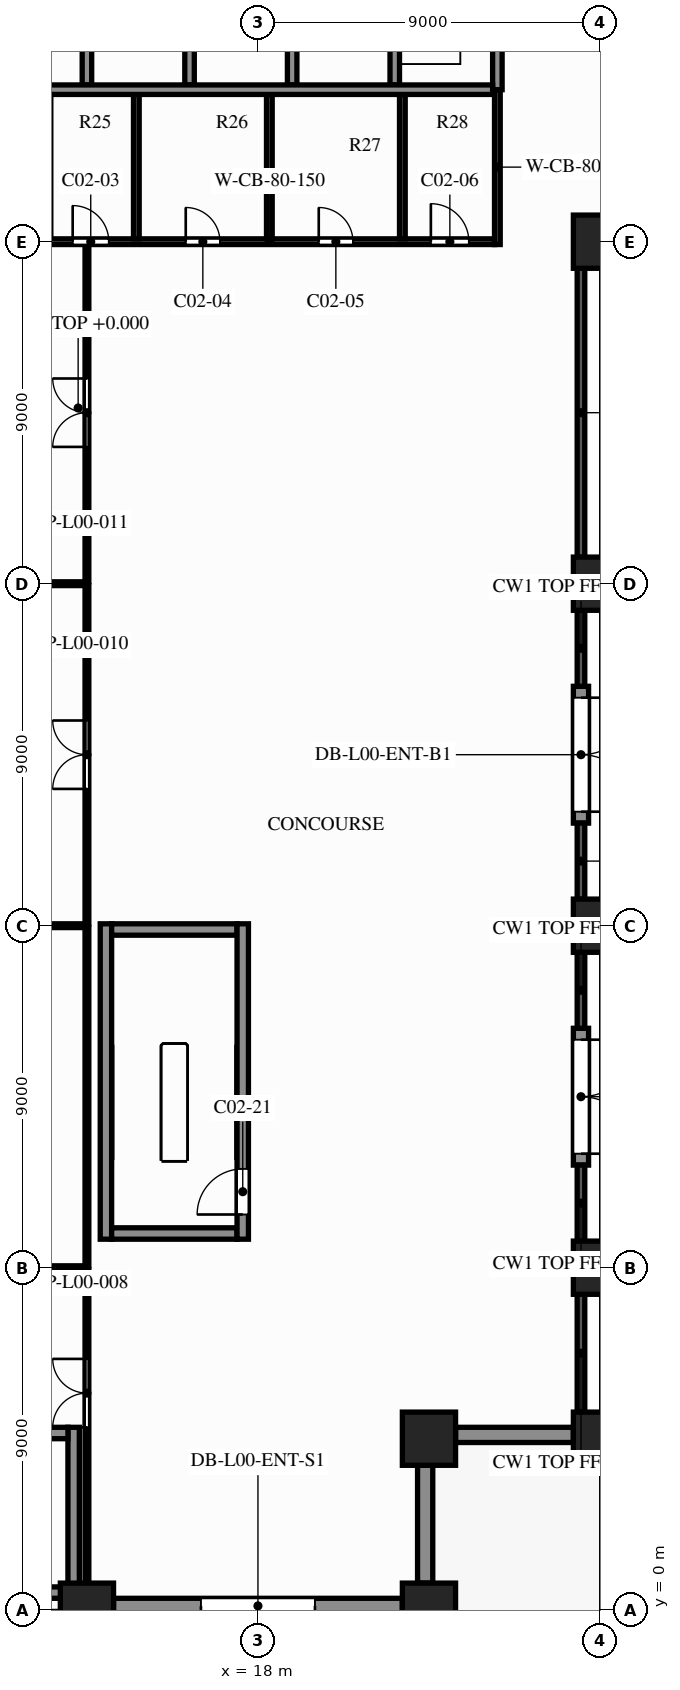
"""IFC4 building model, lengths in metres.
Left out: names, types, materials, properties, quantities, classifications, styles, units other than length and angle.
Written with IfcOpenShell. Run it as: python <this file> out.ifc"""

import sys

from ifc_helpers import new_model, si_unit, direction, frame, frame_2d, origin, origin_2d, place, context, subcontext, project, spatial, rectangle, extrude, element, fill, save


model = new_model("IFC4")
c1 = context("Model", 3, precision=1e-05, world=origin(), true_north=direction((0.0, 1.0)))
c2 = subcontext(c1, "Body", "Model", "MODEL_VIEW")
j1 = project(units=[si_unit("LENGTHUNIT", "METRE"), si_unit("PLANEANGLEUNIT", "RADIAN")], contexts=[c1])
p1 = place(None, origin())
s1 = spatial("IfcSite", under=j1, at=p1, CompositionType="ELEMENT")
p2 = place(p1, origin())
s2 = spatial("IfcBuilding", under=s1, at=p2, CompositionType="ELEMENT")
p3 = place(p2, origin())
s3 = spatial("IfcBuildingStorey", under=s2, at=p3, CompositionType="ELEMENT", Elevation=0.0)
for number, where, z_axis, x_axis in (
    (1, (13.5, 0.0, 0.0), (0.0, 0.0, 1.0), (1.0, 0.0, 0.0)),
    (2, (22.5, 0.0, 0.0), (0.0, 0.0, 1.0), (1.0, 0.0, 0.0)),
    (3, (27.0, 4.5, 0.0), (0.0, 0.0, 1.0), (1.0, 0.0, 0.0)),
    (4, (27.0, 9.0, 0.0), (0.0, 0.0, 1.0), (1.0, 0.0, 0.0)),
    (5, (27.0, 18.0, 0.0), (0.0, 0.0, 1.0), (1.0, 0.0, 0.0)),
    (6, (27.0, 27.0, 0.0), (0.0, 0.0, 1.0), (1.0, 0.0, 0.0)),
    (7, (27.0, 36.0, 0.0), (0.0, 0.0, 1.0), (1.0, 0.0, 0.0)),
    (8, (22.5, 4.5, 0.0), (0.0, 0.0, 1.0), (1.0, 0.0, 0.0)),
):
    element("IfcColumn", number, at=place(p3, frame(where, z_axis=z_axis, x_axis=x_axis)), inside=s3, PredefinedType="COLUMN", context=c2, shape_type="SweptSolid", body=[
        extrude(rectangle(XDim=1.4, YDim=1.4, at=origin_2d()), origin(), (0.0, 0.0, 1.0), 7.5),
    ])
p4 = place(p3, frame((21.8, 0.1, 0.0), z_axis=(0.0, 0.0, 1.0), x_axis=(-1.0, 0.0, 0.0)))
e9 = element("IfcWall", 9, at=p4, inside=s3, PredefinedType="SOLIDWALL", context=c2, shape_type="SweptSolid", body=[
    extrude(rectangle(XDim=7.6, YDim=0.4, at=frame_2d((3.8, 0.0))), origin(), (0.0, 0.0, 1.0), 6.6),
])
p5 = place(p4, frame((2.3, 0.0, 0.0)))
e10 = element("IfcOpeningElement", 10, at=p5, cuts=e9, PredefinedType="OPENING", context=c2, shape_type="SweptSolid", body=[
    extrude(rectangle(XDim=3.0, YDim=3.0, at=frame_2d((1.5, 1.5))), frame((0.0, 0.21, 0.0), z_axis=(0.0, -1.0, 0.0), x_axis=(1.0, 0.0, 0.0)), (0.0, 0.0, 1.0), 0.42),
])
for number, where, z_axis, x_axis in (
    (11, (22.4, 3.8, 0.0), (0.0, 0.0, 1.0), (0.0, -1.0, 0.0)),
    (12, (26.3, 4.6, 0.0), (0.0, 0.0, 1.0), (-1.0, 0.0, 0.0)),
):
    element("IfcWall", number, at=place(p3, frame(where, z_axis=z_axis, x_axis=x_axis)), inside=s3, PredefinedType="SOLIDWALL", context=c2, shape_type="SweptSolid", body=[
        extrude(rectangle(XDim=3.1, YDim=0.4, at=frame_2d((1.55, 0.0))), origin(), (0.0, 0.0, 1.0), 6.6),
    ])
p6 = place(p3, frame((26.5, 15.3, 0.0), z_axis=(0.0, 0.0, 1.0), x_axis=(0.0, -1.0, 0.0)))
e13 = element("IfcWall", 13, at=p6, inside=s3, PredefinedType="SOLIDWALL", context=c2, shape_type="SweptSolid", body=[
    extrude(rectangle(XDim=3.6, YDim=0.4, at=frame_2d((1.8, 0.0))), origin(), (0.0, 0.0, 1.0), 6.6),
])
p7 = place(p6, frame((0.3, 0.0, 0.0)))
e14 = element("IfcOpeningElement", 14, at=p7, cuts=e13, PredefinedType="OPENING", context=c2, shape_type="SweptSolid", body=[
    extrude(rectangle(XDim=3.0, YDim=3.0, at=frame_2d((1.5, 1.5))), frame((0.0, 0.21, 0.0), z_axis=(0.0, -1.0, 0.0), x_axis=(1.0, 0.0, 0.0)), (0.0, 0.0, 1.0), 0.42),
])
p8 = place(p3, frame((26.5, 24.3, 0.0), z_axis=(0.0, 0.0, 1.0), x_axis=(0.0, -1.0, 0.0)))
e15 = element("IfcWall", 15, at=p8, inside=s3, PredefinedType="SOLIDWALL", context=c2, shape_type="SweptSolid", body=[
    extrude(rectangle(XDim=3.6, YDim=0.4, at=frame_2d((1.8, 0.0))), origin(), (0.0, 0.0, 1.0), 6.6),
])
p9 = place(p8, frame((0.3, 0.0, 0.0)))
e16 = element("IfcOpeningElement", 16, at=p9, cuts=e15, PredefinedType="OPENING", context=c2, shape_type="SweptSolid", body=[
    extrude(rectangle(XDim=3.0, YDim=3.0, at=frame_2d((1.5, 1.5))), frame((0.0, 0.21, 0.0), z_axis=(0.0, -1.0, 0.0), x_axis=(1.0, 0.0, 0.0)), (0.0, 0.0, 1.0), 0.42),
])
p10 = place(p3, frame((5.0, 0.45, 0.0), z_axis=(0.0, 0.0, 1.0), x_axis=(1.0, 0.0, 0.0)))
e17 = element("IfcWall", 17, at=p10, inside=s3, PredefinedType="SHEAR", context=c2, shape_type="SweptSolid", body=[
    extrude(rectangle(XDim=8.0, YDim=0.3, at=frame_2d((4.0, 0.0))), origin(), (0.0, 0.0, 1.0), 7.2),
])
p11 = place(p10, frame((0.5, 0.0, 0.0)))
e18 = element("IfcOpeningElement", 18, at=p11, cuts=e17, PredefinedType="OPENING", context=c2, shape_type="SweptSolid", body=[
    extrude(rectangle(XDim=1.2, YDim=2.2, at=frame_2d((0.6, 1.1))), frame((0.0, 0.16, 0.0), z_axis=(0.0, -1.0, 0.0), x_axis=(1.0, 0.0, 0.0)), (0.0, 0.0, 1.0), 0.32),
])
p12 = place(p3, frame((5.0, 4.65, 0.0), z_axis=(0.0, 0.0, 1.0), x_axis=(1.0, 0.0, 0.0)))
e19 = element("IfcWall", 19, at=p12, inside=s3, PredefinedType="SHEAR", context=c2, shape_type="SweptSolid", body=[
    extrude(rectangle(XDim=8.0, YDim=0.3, at=frame_2d((4.0, 0.0))), origin(), (0.0, 0.0, 1.0), 7.2),
])
p13 = place(p12, frame((0.5, 0.0, 0.0)))
e20 = element("IfcOpeningElement", 20, at=p13, cuts=e19, PredefinedType="OPENING", context=c2, shape_type="SweptSolid", body=[
    extrude(rectangle(XDim=1.2, YDim=2.2, at=frame_2d((0.6, 1.1))), frame((0.0, 0.16, 0.0), z_axis=(0.0, -1.0, 0.0), x_axis=(1.0, 0.0, 0.0)), (0.0, 0.0, 1.0), 0.32),
])
for number, where, z_axis, x_axis in (
    (21, (14.15, 9.9, 0.0), (0.0, 0.0, 1.0), (1.0, 0.0, 0.0)),
    (22, (14.15, 17.9, 0.0), (0.0, 0.0, 1.0), (1.0, 0.0, 0.0)),
):
    element("IfcWall", number, at=place(p3, frame(where, z_axis=z_axis, x_axis=x_axis)), inside=s3, PredefinedType="SHEAR", context=c2, shape_type="SweptSolid", body=[
        extrude(rectangle(XDim=3.3, YDim=0.3, at=frame_2d((1.65, 0.0))), origin(), (0.0, 0.0, 1.0), 7.2),
    ])
p14 = place(p3, frame((12.4, 36.0, 0.0), z_axis=(0.0, 0.0, 1.0), x_axis=(1.0, 0.0, 0.0)))
e23 = element("IfcWall", 23, at=p14, inside=s3, PredefinedType="SHEAR", context=c2, shape_type="SweptSolid", body=[
    extrude(rectangle(XDim=11.825, YDim=0.15, at=frame_2d((5.913, 0.0))), origin(), (0.0, 0.0, 1.0), 7.2),
])
p15 = place(p14, frame((0.725, 0.0, 0.0)))
e24 = element("IfcOpeningElement", 24, at=p15, cuts=e23, PredefinedType="OPENING", context=c2, shape_type="SweptSolid", body=[
    extrude(rectangle(XDim=0.95, YDim=2.1, at=frame_2d((0.475, 1.05))), frame((0.0, 0.085, 0.0), z_axis=(0.0, -1.0, 0.0), x_axis=(1.0, 0.0, 0.0)), (0.0, 0.0, 1.0), 0.17),
])
p16 = place(p14, frame((3.7, 0.0, 0.0)))
e25 = element("IfcOpeningElement", 25, at=p16, cuts=e23, PredefinedType="OPENING", context=c2, shape_type="SweptSolid", body=[
    extrude(rectangle(XDim=0.9, YDim=2.1, at=frame_2d((0.45, 1.05))), frame((0.0, 0.085, 0.0), z_axis=(0.0, -1.0, 0.0), x_axis=(1.0, 0.0, 0.0)), (0.0, 0.0, 1.0), 0.17),
])
p17 = place(p14, frame((7.2, 0.0, 0.0)))
e26 = element("IfcOpeningElement", 26, at=p17, cuts=e23, PredefinedType="OPENING", context=c2, shape_type="SweptSolid", body=[
    extrude(rectangle(XDim=0.9, YDim=2.1, at=frame_2d((0.45, 1.05))), frame((0.0, 0.085, 0.0), z_axis=(0.0, -1.0, 0.0), x_axis=(1.0, 0.0, 0.0)), (0.0, 0.0, 1.0), 0.17),
])
p18 = place(p14, frame((10.15, 0.0, 0.0)))
e27 = element("IfcOpeningElement", 27, at=p18, cuts=e23, PredefinedType="OPENING", context=c2, shape_type="SweptSolid", body=[
    extrude(rectangle(XDim=1.0, YDim=2.1, at=frame_2d((0.5, 1.05))), frame((0.0, 0.085, 0.0), z_axis=(0.0, -1.0, 0.0), x_axis=(1.0, 0.0, 0.0)), (0.0, 0.0, 1.0), 0.17),
])
p19 = place(p3, frame((8.1, 40.0, 0.0), z_axis=(0.0, 0.0, 1.0), x_axis=(1.0, 0.0, 0.0)))
e28 = element("IfcWall", 28, at=p19, inside=s3, PredefinedType="SHEAR", context=c2, shape_type="SweptSolid", body=[
    extrude(rectangle(XDim=16.075, YDim=0.25, at=frame_2d((8.038, 0.0))), origin(), (0.0, 0.0, 1.0), 7.2),
])
p20 = place(p3, frame((13.15, 0.3, 0.0), z_axis=(0.0, 0.0, 1.0), x_axis=(0.0, 1.0, 0.0)))
e29 = element("IfcWall", 29, at=p20, inside=s3, PredefinedType="SHEAR", context=c2, shape_type="SweptSolid", body=[
    extrude(rectangle(XDim=4.5, YDim=0.3, at=frame_2d((2.25, 0.0))), origin(), (0.0, 0.0, 1.0), 7.2),
])
p21 = place(p3, frame((13.5, 40.125, 0.0), z_axis=(0.0, 0.0, 1.0), x_axis=(0.0, 1.0, 0.0)))
e30 = element("IfcWall", 30, at=p21, inside=s3, PredefinedType="SHEAR", context=c2, shape_type="SweptSolid", body=[
    extrude(rectangle(XDim=2.95, YDim=0.25, at=frame_2d((1.475, 0.0))), origin(), (0.0, 0.0, 1.0), 7.2),
])
p22 = place(p3, frame((14.0, 9.75, 0.0), z_axis=(0.0, 0.0, 1.0), x_axis=(0.0, 1.0, 0.0)))
e31 = element("IfcWall", 31, at=p22, inside=s3, PredefinedType="SHEAR", context=c2, shape_type="SweptSolid", body=[
    extrude(rectangle(XDim=8.3, YDim=0.3, at=frame_2d((4.15, 0.0))), origin(), (0.0, 0.0, 1.0), 7.2),
])
p23 = place(p3, frame((14.8, 36.075, 0.0), z_axis=(0.0, 0.0, 1.0), x_axis=(0.0, 1.0, 0.0)))
e32 = element("IfcWall", 32, at=p23, inside=s3, PredefinedType="PARTITIONING", context=c2, shape_type="SweptSolid", body=[
    extrude(rectangle(XDim=3.8, YDim=0.15, at=frame_2d((1.9, 0.0))), origin(), (0.0, 0.0, 1.0), 7.2),
])
p24 = place(p3, frame((16.2, 40.125, 0.0), z_axis=(0.0, 0.0, 1.0), x_axis=(0.0, 1.0, 0.0)))
e33 = element("IfcWall", 33, at=p24, inside=s3, PredefinedType="SHEAR", context=c2, shape_type="SweptSolid", body=[
    extrude(rectangle(XDim=2.95, YDim=0.25, at=frame_2d((1.475, 0.0))), origin(), (0.0, 0.0, 1.0), 7.2),
])
p25 = place(p3, frame((17.6, 9.75, 0.0), z_axis=(0.0, 0.0, 1.0), x_axis=(0.0, 1.0, 0.0)))
e34 = element("IfcWall", 34, at=p25, inside=s3, PredefinedType="SHEAR", context=c2, shape_type="SweptSolid", body=[
    extrude(rectangle(XDim=8.3, YDim=0.3, at=frame_2d((4.15, 0.0))), origin(), (0.0, 0.0, 1.0), 7.2),
])
p26 = place(p25, frame((0.65, 0.0, 0.0)))
e35 = element("IfcOpeningElement", 35, at=p26, cuts=e34, PredefinedType="OPENING", context=c2, shape_type="SweptSolid", body=[
    extrude(rectangle(XDim=1.2, YDim=2.2, at=frame_2d((0.6, 1.1))), frame((0.0, 0.16, 0.0), z_axis=(0.0, -1.0, 0.0), x_axis=(1.0, 0.0, 0.0)), (0.0, 0.0, 1.0), 0.32),
])
p27 = place(p3, frame((18.3, 36.075, 0.0), z_axis=(0.0, 0.0, 1.0), x_axis=(0.0, 1.0, 0.0)))
e36 = element("IfcWall", 36, at=p27, inside=s3, PredefinedType="PARTITIONING", context=c2, shape_type="SweptSolid", body=[
    extrude(rectangle(XDim=3.8, YDim=0.15, at=frame_2d((1.9, 0.0))), origin(), (0.0, 0.0, 1.0), 7.2),
])
for number, where, z_axis, x_axis in (
    (37, (18.9, 40.125, 0.0), (0.0, 0.0, 1.0), (0.0, 1.0, 0.0)),
    (38, (21.6, 40.125, 0.0), (0.0, 0.0, 1.0), (0.0, 1.0, 0.0)),
):
    element("IfcWall", number, at=place(p3, frame(where, z_axis=z_axis, x_axis=x_axis)), inside=s3, PredefinedType="SHEAR", context=c2, shape_type="SweptSolid", body=[
        extrude(rectangle(XDim=2.95, YDim=0.25, at=frame_2d((1.475, 0.0))), origin(), (0.0, 0.0, 1.0), 7.2),
    ])
p28 = place(p3, frame((21.8, 36.075, 0.0), z_axis=(0.0, 0.0, 1.0), x_axis=(0.0, 1.0, 0.0)))
e39 = element("IfcWall", 39, at=p28, inside=s3, PredefinedType="PARTITIONING", context=c2, shape_type="SweptSolid", body=[
    extrude(rectangle(XDim=3.8, YDim=0.15, at=frame_2d((1.9, 0.0))), origin(), (0.0, 0.0, 1.0), 7.2),
])
p29 = place(p3, frame((24.3, 35.925, 0.0), z_axis=(0.0, 0.0, 1.0), x_axis=(0.0, 1.0, 0.0)))
e40 = element("IfcWall", 40, at=p29, inside=s3, PredefinedType="SHEAR", context=c2, shape_type="SweptSolid", body=[
    extrude(rectangle(XDim=4.075, YDim=0.15, at=frame_2d((2.038, 0.0))), origin(), (0.0, 0.0, 1.0), 7.2),
])
p30 = place(p3, frame((24.3, 40.0, 0.0), z_axis=(0.0, 0.0, 1.0), x_axis=(0.0, 1.0, 0.0)))
e41 = element("IfcWall", 41, at=p30, inside=s3, PredefinedType="SHEAR", context=c2, shape_type="SweptSolid", body=[
    extrude(rectangle(XDim=3.325, YDim=0.25, at=frame_2d((1.663, 0.0))), origin(), (0.0, 0.0, 1.0), 7.2),
])
p31 = place(p3, frame((13.5, 0.72, 0.0), z_axis=(0.0, 0.0, 1.0), x_axis=(0.0, 1.0, 0.0)))
e42 = element("IfcWall", 42, at=p31, inside=s3, PredefinedType="PARTITIONING", context=c2, shape_type="SweptSolid", body=[
    extrude(rectangle(XDim=8.23, YDim=0.1, at=frame_2d((4.115, 0.0))), origin(), (0.0, 0.0, 1.0), 6.48),
])
p32 = place(p31, frame((4.08, 0.0, 0.0)))
e43 = element("IfcOpeningElement", 43, at=p32, cuts=e42, PredefinedType="OPENING", context=c2, shape_type="SweptSolid", body=[
    extrude(rectangle(XDim=1.8, YDim=2.1, at=frame_2d((0.9, 1.05))), frame((0.0, 0.06, 0.0), z_axis=(0.0, -1.0, 0.0), x_axis=(1.0, 0.0, 0.0)), (0.0, 0.0, 1.0), 0.12),
])
p33 = place(p3, frame((0.72, 9.0, 0.0), z_axis=(0.0, 0.0, 1.0), x_axis=(1.0, 0.0, 0.0)))
e44 = element("IfcWall", 44, at=p33, inside=s3, PredefinedType="PARTITIONING", context=c2, shape_type="SweptSolid", body=[
    extrude(rectangle(XDim=12.73, YDim=0.1, at=frame_2d((6.365, 0.0))), origin(), (0.0, 0.0, 1.0), 6.48),
])
p34 = place(p33, frame((5.58, 0.0, 0.0)))
e45 = element("IfcOpeningElement", 45, at=p34, cuts=e44, PredefinedType="OPENING", context=c2, shape_type="SweptSolid", body=[
    extrude(rectangle(XDim=0.9, YDim=2.1, at=frame_2d((0.45, 1.05))), frame((0.0, 0.06, 0.0), z_axis=(0.0, -1.0, 0.0), x_axis=(1.0, 0.0, 0.0)), (0.0, 0.0, 1.0), 0.12),
])
p35 = place(p3, frame((13.5, 9.05, 0.0), z_axis=(0.0, 0.0, 1.0), x_axis=(0.0, 1.0, 0.0)))
e46 = element("IfcWall", 46, at=p35, inside=s3, PredefinedType="PARTITIONING", context=c2, shape_type="SweptSolid", body=[
    extrude(rectangle(XDim=8.9, YDim=0.1, at=frame_2d((4.45, 0.0))), origin(), (0.0, 0.0, 1.0), 6.48),
])
p36 = place(p3, frame((-0.18, 18.0, 0.0), z_axis=(0.0, 0.0, 1.0), x_axis=(1.0, 0.0, 0.0)))
e47 = element("IfcWall", 47, at=p36, inside=s3, PredefinedType="PARTITIONING", context=c2, shape_type="SweptSolid", body=[
    extrude(rectangle(XDim=13.63, YDim=0.1, at=frame_2d((6.815, 0.0))), origin(), (0.0, 0.0, 1.0), 6.48),
])
p37 = place(p3, frame((13.5, 18.05, 0.0), z_axis=(0.0, 0.0, 1.0), x_axis=(0.0, 1.0, 0.0)))
e48 = element("IfcWall", 48, at=p37, inside=s3, PredefinedType="PARTITIONING", context=c2, shape_type="SweptSolid", body=[
    extrude(rectangle(XDim=8.9, YDim=0.1, at=frame_2d((4.45, 0.0))), origin(), (0.0, 0.0, 1.0), 6.48),
])
p38 = place(p37, frame((3.55, 0.0, 0.0)))
e49 = element("IfcOpeningElement", 49, at=p38, cuts=e48, PredefinedType="OPENING", context=c2, shape_type="SweptSolid", body=[
    extrude(rectangle(XDim=1.8, YDim=2.1, at=frame_2d((0.9, 1.05))), frame((0.0, 0.06, 0.0), z_axis=(0.0, -1.0, 0.0), x_axis=(1.0, 0.0, 0.0)), (0.0, 0.0, 1.0), 0.12),
])
p39 = place(p3, frame((10.9, 27.0, 0.0), z_axis=(0.0, 0.0, 1.0), x_axis=(1.0, 0.0, 0.0)))
e50 = element("IfcWall", 50, at=p39, inside=s3, PredefinedType="PARTITIONING", context=c2, shape_type="SweptSolid", body=[
    extrude(rectangle(XDim=2.55, YDim=0.1, at=frame_2d((1.275, 0.0))), origin(), (0.0, 0.0, 1.0), 6.48),
])
p40 = place(p3, frame((13.5, 27.05, 0.0), z_axis=(0.0, 0.0, 1.0), x_axis=(0.0, 1.0, 0.0)))
e51 = element("IfcWall", 51, at=p40, inside=s3, PredefinedType="PARTITIONING", context=c2, shape_type="SweptSolid", body=[
    extrude(rectangle(XDim=8.8, YDim=0.1, at=frame_2d((4.4, 0.0))), origin(), (0.0, 0.0, 1.0), 6.48),
])
p41 = place(p40, frame((3.55, 0.0, 0.0)))
e52 = element("IfcOpeningElement", 52, at=p41, cuts=e51, PredefinedType="OPENING", context=c2, shape_type="SweptSolid", body=[
    extrude(rectangle(XDim=1.8, YDim=2.1, at=frame_2d((0.9, 1.05))), frame((0.0, 0.06, 0.0), z_axis=(0.0, -1.0, 0.0), x_axis=(1.0, 0.0, 0.0)), (0.0, 0.0, 1.0), 0.12),
])
p42 = place(p5, origin())
e53 = element("IfcDoor", 53, at=p42, inside=s3, OperationType="DOUBLE_DOOR_SINGLE_SWING", PredefinedType="DOOR", context=c2, shape_type="SweptSolid", body=[
    extrude(rectangle(XDim=3.0, YDim=3.0, at=frame_2d((1.5, 1.5))), frame((0.0, 0.025, 0.0), z_axis=(0.0, -1.0, 0.0), x_axis=(1.0, 0.0, 0.0)), (0.0, 0.0, 1.0), 0.05),
])
fill(e10, e53)
p43 = place(p7, origin())
e54 = element("IfcDoor", 54, at=p43, inside=s3, OperationType="DOUBLE_DOOR_SINGLE_SWING", PredefinedType="DOOR", context=c2, shape_type="SweptSolid", body=[
    extrude(rectangle(XDim=3.0, YDim=3.0, at=frame_2d((1.5, 1.5))), frame((0.0, 0.025, 0.0), z_axis=(0.0, -1.0, 0.0), x_axis=(1.0, 0.0, 0.0)), (0.0, 0.0, 1.0), 0.05),
])
fill(e14, e54)
p44 = place(p9, origin())
e55 = element("IfcDoor", 55, at=p44, inside=s3, OperationType="DOUBLE_DOOR_SINGLE_SWING", PredefinedType="DOOR", context=c2, shape_type="SweptSolid", body=[
    extrude(rectangle(XDim=3.0, YDim=3.0, at=frame_2d((1.5, 1.5))), frame((0.0, 0.025, 0.0), z_axis=(0.0, -1.0, 0.0), x_axis=(1.0, 0.0, 0.0)), (0.0, 0.0, 1.0), 0.05),
])
fill(e16, e55)
p45 = place(p15, origin())
e56 = element("IfcDoor", 56, at=p45, inside=s3, OperationType="SINGLE_SWING_RIGHT", PredefinedType="DOOR", context=c2, shape_type="SweptSolid", body=[
    extrude(rectangle(XDim=0.95, YDim=2.1, at=frame_2d((0.475, 1.05))), frame((0.0, 0.025, 0.0), z_axis=(0.0, -1.0, 0.0), x_axis=(1.0, 0.0, 0.0)), (0.0, 0.0, 1.0), 0.05),
])
fill(e24, e56)
p46 = place(p16, origin())
e57 = element("IfcDoor", 57, at=p46, inside=s3, OperationType="SINGLE_SWING_LEFT", PredefinedType="DOOR", context=c2, shape_type="SweptSolid", body=[
    extrude(rectangle(XDim=0.9, YDim=2.1, at=frame_2d((0.45, 1.05))), frame((0.0, 0.025, 0.0), z_axis=(0.0, -1.0, 0.0), x_axis=(1.0, 0.0, 0.0)), (0.0, 0.0, 1.0), 0.05),
])
fill(e25, e57)
p47 = place(p17, origin())
e58 = element("IfcDoor", 58, at=p47, inside=s3, OperationType="SINGLE_SWING_RIGHT", PredefinedType="DOOR", context=c2, shape_type="SweptSolid", body=[
    extrude(rectangle(XDim=0.9, YDim=2.1, at=frame_2d((0.45, 1.05))), frame((0.0, 0.025, 0.0), z_axis=(0.0, -1.0, 0.0), x_axis=(1.0, 0.0, 0.0)), (0.0, 0.0, 1.0), 0.05),
])
fill(e26, e58)
p48 = place(p18, origin())
e59 = element("IfcDoor", 59, at=p48, inside=s3, OperationType="SINGLE_SWING_LEFT", PredefinedType="DOOR", context=c2, shape_type="SweptSolid", body=[
    extrude(rectangle(XDim=1.0, YDim=2.1, at=frame_2d((0.5, 1.05))), frame((0.0, 0.025, 0.0), z_axis=(0.0, -1.0, 0.0), x_axis=(1.0, 0.0, 0.0)), (0.0, 0.0, 1.0), 0.05),
])
fill(e27, e59)
p49 = place(p26, origin())
e60 = element("IfcDoor", 60, at=p49, inside=s3, OperationType="SINGLE_SWING_LEFT", PredefinedType="DOOR", context=c2, shape_type="SweptSolid", body=[
    extrude(rectangle(XDim=1.2, YDim=2.2, at=frame_2d((0.6, 1.1))), frame((0.0, 0.025, 0.0), z_axis=(0.0, -1.0, 0.0), x_axis=(1.0, 0.0, 0.0)), (0.0, 0.0, 1.0), 0.05),
])
fill(e35, e60)
p50 = place(p32, origin())
e61 = element("IfcDoor", 61, at=p50, inside=s3, OperationType="DOUBLE_DOOR_SINGLE_SWING", PredefinedType="DOOR", context=c2, shape_type="SweptSolid", body=[
    extrude(rectangle(XDim=1.8, YDim=2.1, at=frame_2d((0.9, 1.05))), frame((0.0, 0.025, 0.0), z_axis=(0.0, -1.0, 0.0), x_axis=(1.0, 0.0, 0.0)), (0.0, 0.0, 1.0), 0.05),
])
fill(e43, e61)
p51 = place(p38, origin())
e62 = element("IfcDoor", 62, at=p51, inside=s3, OperationType="DOUBLE_DOOR_SINGLE_SWING", PredefinedType="DOOR", context=c2, shape_type="SweptSolid", body=[
    extrude(rectangle(XDim=1.8, YDim=2.1, at=frame_2d((0.9, 1.05))), frame((0.0, 0.025, 0.0), z_axis=(0.0, -1.0, 0.0), x_axis=(1.0, 0.0, 0.0)), (0.0, 0.0, 1.0), 0.05),
])
fill(e49, e62)
p52 = place(p41, origin())
e63 = element("IfcDoor", 63, at=p52, inside=s3, OperationType="DOUBLE_DOOR_SINGLE_SWING", PredefinedType="DOOR", context=c2, shape_type="SweptSolid", body=[
    extrude(rectangle(XDim=1.8, YDim=2.1, at=frame_2d((0.9, 1.05))), frame((0.0, 0.025, 0.0), z_axis=(0.0, -1.0, 0.0), x_axis=(1.0, 0.0, 0.0)), (0.0, 0.0, 1.0), 0.05),
])
fill(e52, e63)
save(model, sys.argv[1])
